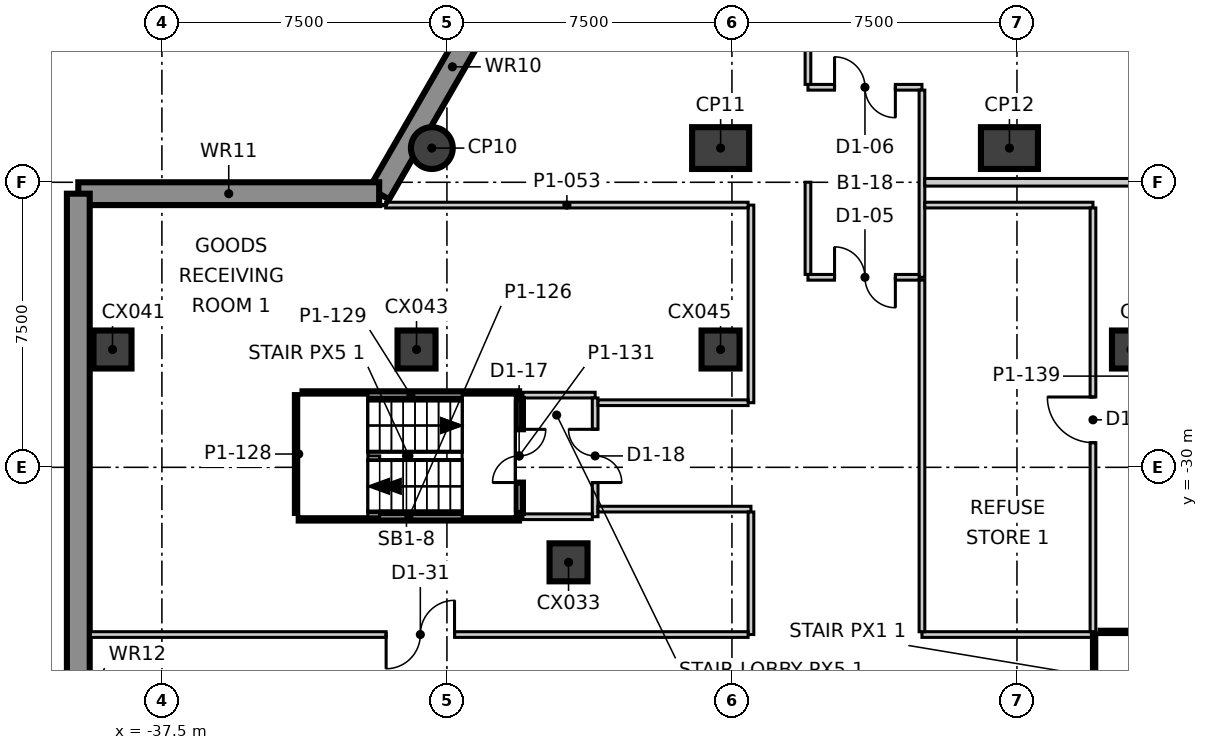
"""IFC4 building model, lengths in metres.
Left out: names, types, materials, properties, quantities, classifications, styles, units other than length and angle.
Written with IfcOpenShell. Run it as: python <this file> out.ifc"""

import sys

from ifc_helpers import new_model, si_unit, direction, frame, frame_2d, origin, origin_2d, place, context, subcontext, project, spatial, rectangle, circle, extrude, element, fill, save


model = new_model("IFC4")
c1 = context("Model", 3, precision=1e-05, world=origin(), true_north=direction((0.0, 1.0)))
c2 = subcontext(c1, "Body", "Model", "MODEL_VIEW")
j1 = project(units=[si_unit("LENGTHUNIT", "METRE"), si_unit("PLANEANGLEUNIT", "RADIAN")], contexts=[c1])
p1 = place(None, origin())
s1 = spatial("IfcSite", under=j1, at=p1, CompositionType="ELEMENT")
p2 = place(p1, origin())
s2 = spatial("IfcBuilding", under=s1, at=p2, CompositionType="ELEMENT")
p3 = place(p2, frame((0.0, 0.0, -5.5)))
s3 = spatial("IfcBuildingStorey", under=s2, at=p3, CompositionType="ELEMENT", Elevation=-5.5)
p4 = place(p3, frame((-27.929, -16.125, -0.4), z_axis=(0.0, 0.0, 1.0), x_axis=(-0.500015828289, -0.866016265125, 0.0)))
e1 = element("IfcWall", 1, at=p4, inside=s3, PredefinedType="SOLIDWALL", context=c2, shape_type="SweptSolid", body=[
    extrude(rectangle(XDim=7.708, YDim=0.6, at=frame_2d((3.854, 0.0))), origin(), (0.0, 0.0, 1.0), 5.5),
])
p5 = place(p3, frame((-31.783, -22.8, -0.4), z_axis=(0.0, 0.0, 1.0), x_axis=(-1.0, 0.0, 0.0)))
e2 = element("IfcWall", 2, at=p5, inside=s3, PredefinedType="SOLIDWALL", context=c2, shape_type="SweptSolid", body=[
    extrude(rectangle(XDim=7.917, YDim=0.6, at=frame_2d((3.958, 0.0))), origin(), (0.0, 0.0, 1.0), 5.5),
])
p6 = place(p3, frame((-39.7, -22.8, -0.4), z_axis=(0.0, 0.0, 1.0), x_axis=(0.0, -1.0, 0.0)))
e3 = element("IfcWall", 3, at=p6, inside=s3, PredefinedType="SOLIDWALL", context=c2, shape_type="SweptSolid", body=[
    extrude(rectangle(XDim=27.4, YDim=0.6, at=frame_2d((13.7, 0.0))), origin(), (0.0, 0.0, 1.0), 5.5),
])
p7 = place(p3, frame((-30.397, -21.6, -0.4), z_axis=(0.0, 0.0, 1.0), x_axis=(1.0, 0.0, 0.0)))
e4 = element("IfcColumn", 4, at=p7, inside=s3, PredefinedType="COLUMN", context=c2, shape_type="SweptSolid", body=[
    extrude(circle(Radius=0.55, at=origin_2d()), origin(), (0.0, 0.0, 1.0), 5.5),
])
for number, where, z_axis, x_axis in (
    (5, (-22.798, -21.6, -0.4), (0.0, 0.0, 1.0), (1.0, 0.0, 0.0)),
    (6, (-15.198, -21.6, -0.4), (0.0, 0.0, 1.0), (1.0, 0.0, 0.0)),
):
    element("IfcColumn", number, at=place(p3, frame(where, z_axis=z_axis, x_axis=x_axis)), inside=s3, PredefinedType="COLUMN", context=c2, shape_type="SweptSolid", body=[
        extrude(rectangle(XDim=1.5, YDim=1.1, at=origin_2d()), origin(), (0.0, 0.0, 1.0), 5.5),
    ])
for number, where, z_axis, x_axis in (
    (7, (-26.8, -32.5, -0.4), (0.0, 0.0, 1.0), (1.0, 0.0, 0.0)),
    (8, (-38.8, -26.9, -0.4), (0.0, 0.0, 1.0), (1.0, 0.0, 0.0)),
    (9, (-30.8, -26.9, -0.4), (0.0, 0.0, 1.0), (1.0, 0.0, 0.0)),
    (10, (-22.8, -26.9, -0.4), (0.0, 0.0, 1.0), (1.0, 0.0, 0.0)),
    (11, (-12.0, -26.9, -0.4), (0.0, 0.0, 1.0), (1.0, 0.0, 0.0)),
):
    element("IfcColumn", number, at=place(p3, frame(where, z_axis=z_axis, x_axis=x_axis)), inside=s3, PredefinedType="COLUMN", context=c2, shape_type="SweptSolid", body=[
        extrude(rectangle(XDim=1.0, YDim=1.0, at=origin_2d()), origin(), (0.0, 0.0, 1.0), 5.5),
    ])
p8 = place(p3, frame((-28.0, -28.1, 0.0), z_axis=(0.0, 0.0, 1.0), x_axis=(1.0, 0.0, 0.0)))
e12 = element("IfcWall", 12, at=p8, inside=s3, PredefinedType="PARTITIONING", context=c2, shape_type="SweptSolid", body=[
    extrude(rectangle(XDim=1.9, YDim=0.15, at=frame_2d((0.95, 0.0))), origin(), (0.0, 0.0, 1.0), 5.1),
])
p9 = place(p3, frame((-26.1, -31.3, 0.0), z_axis=(0.0, 0.0, 1.0), x_axis=(0.0, 1.0, 0.0)))
e13 = element("IfcWall", 13, at=p9, inside=s3, PredefinedType="PARTITIONING", context=c2, shape_type="SweptSolid", body=[
    extrude(rectangle(XDim=3.125, YDim=0.15, at=frame_2d((1.562, 0.0))), origin(), (0.0, 0.0, 1.0), 5.1),
])
p10 = place(p9, frame((0.9, 0.0, 0.0)))
e14 = element("IfcOpeningElement", 14, at=p10, cuts=e13, PredefinedType="OPENING", context=c2, shape_type="SweptSolid", body=[
    extrude(rectangle(XDim=1.4, YDim=2.1, at=frame_2d((0.7, 1.05))), frame((0.0, 0.085, 0.0), z_axis=(0.0, -1.0, 0.0), x_axis=(1.0, 0.0, 0.0)), (0.0, 0.0, 1.0), 0.17),
])
p11 = place(p3, frame((-28.0, -31.3, 0.0), z_axis=(0.0, 0.0, 1.0), x_axis=(1.0, 0.0, 0.0)))
e15 = element("IfcWall", 15, at=p11, inside=s3, PredefinedType="PARTITIONING", context=c2, shape_type="SweptSolid", body=[
    extrude(rectangle(XDim=1.825, YDim=0.15, at=frame_2d((0.913, 0.0))), origin(), (0.0, 0.0, 1.0), 5.1),
])
p12 = place(p3, frame((-20.5, -20.0, 0.0), z_axis=(0.0, 0.0, 1.0), x_axis=(1.0, 0.0, 0.0)))
e16 = element("IfcWall", 16, at=p12, inside=s3, PredefinedType="PARTITIONING", context=c2, shape_type="SweptSolid", body=[
    extrude(rectangle(XDim=3.0, YDim=0.15, at=frame_2d((1.5, 0.0))), origin(), (0.0, 0.0, 1.0), 5.1),
])
p13 = place(p12, frame((0.7, 0.0, 0.0)))
e17 = element("IfcOpeningElement", 17, at=p13, cuts=e16, PredefinedType="OPENING", context=c2, shape_type="SweptSolid", body=[
    extrude(rectangle(XDim=1.6, YDim=2.1, at=frame_2d((0.8, 1.05))), frame((0.0, 0.085, 0.0), z_axis=(0.0, -1.0, 0.0), x_axis=(1.0, 0.0, 0.0)), (0.0, 0.0, 1.0), 0.17),
])
p14 = place(p3, frame((-17.5, -25.0, 0.0), z_axis=(0.0, 0.0, 1.0), x_axis=(0.0, 1.0, 0.0)))
e18 = element("IfcWall", 18, at=p14, inside=s3, PredefinedType="PARTITIONING", context=c2, shape_type="SweptSolid", body=[
    extrude(rectangle(XDim=4.925, YDim=0.15, at=frame_2d((2.462, 0.0))), origin(), (0.0, 0.0, 1.0), 5.1),
])
p15 = place(p3, frame((-20.5, -25.0, 0.0), z_axis=(0.0, 0.0, 1.0), x_axis=(1.0, 0.0, 0.0)))
e19 = element("IfcWall", 19, at=p15, inside=s3, PredefinedType="PARTITIONING", context=c2, shape_type="SweptSolid", body=[
    extrude(rectangle(XDim=2.925, YDim=0.15, at=frame_2d((1.462, 0.0))), origin(), (0.0, 0.0, 1.0), 5.1),
])
p16 = place(p15, frame((0.7, 0.0, 0.0)))
e20 = element("IfcOpeningElement", 20, at=p16, cuts=e19, PredefinedType="OPENING", context=c2, shape_type="SweptSolid", body=[
    extrude(rectangle(XDim=1.6, YDim=2.1, at=frame_2d((0.8, 1.05))), frame((0.0, 0.085, 0.0), z_axis=(0.0, -1.0, 0.0), x_axis=(1.0, 0.0, 0.0)), (0.0, 0.0, 1.0), 0.17),
])
p17 = place(p3, frame((-20.5, -24.925, 0.0), z_axis=(0.0, 0.0, 1.0), x_axis=(0.0, 1.0, 0.0)))
e21 = element("IfcWall", 21, at=p17, inside=s3, PredefinedType="PARTITIONING", context=c2, shape_type="SweptSolid", body=[
    extrude(rectangle(XDim=2.427, YDim=0.15, at=frame_2d((1.213, 0.0))), origin(), (0.0, 0.0, 1.0), 5.1),
])
p18 = place(p3, frame((-26.025, -31.1, 0.0), z_axis=(0.0, 0.0, 1.0), x_axis=(1.0, 0.0, 0.0)))
e22 = element("IfcWall", 22, at=p18, inside=s3, PredefinedType="PARTITIONING", context=c2, shape_type="SweptSolid", body=[
    extrude(rectangle(XDim=4.025, YDim=0.15, at=frame_2d((2.012, 0.0))), origin(), (0.0, 0.0, 1.0), 5.1),
])
p19 = place(p3, frame((-22.0, -34.4, 0.0), z_axis=(0.0, 0.0, 1.0), x_axis=(0.0, 1.0, 0.0)))
e23 = element("IfcWall", 23, at=p19, inside=s3, PredefinedType="PARTITIONING", context=c2, shape_type="SweptSolid", body=[
    extrude(rectangle(XDim=3.225, YDim=0.15, at=frame_2d((1.612, 0.0))), origin(), (0.0, 0.0, 1.0), 5.1),
])
p20 = place(p3, frame((-22.0, -28.3, 0.0), z_axis=(0.0, 0.0, 1.0), x_axis=(0.0, 1.0, 0.0)))
e24 = element("IfcWall", 24, at=p20, inside=s3, PredefinedType="PARTITIONING", context=c2, shape_type="SweptSolid", body=[
    extrude(rectangle(XDim=5.2, YDim=0.15, at=frame_2d((2.6, 0.0))), origin(), (0.0, 0.0, 1.0), 5.1),
])
p21 = place(p3, frame((-39.4, -34.4, 0.0), z_axis=(0.0, 0.0, 1.0), x_axis=(1.0, 0.0, 0.0)))
e25 = element("IfcWall", 25, at=p21, inside=s3, PredefinedType="PARTITIONING", context=c2, shape_type="SweptSolid", body=[
    extrude(rectangle(XDim=17.325, YDim=0.15, at=frame_2d((8.663, 0.0))), origin(), (0.0, 0.0, 1.0), 5.1),
])
p22 = place(p21, frame((7.8, 0.0, 0.0)))
e26 = element("IfcOpeningElement", 26, at=p22, cuts=e25, PredefinedType="OPENING", context=c2, shape_type="SweptSolid", body=[
    extrude(rectangle(XDim=1.8, YDim=2.1, at=frame_2d((0.9, 1.05))), frame((0.0, 0.085, 0.0), z_axis=(0.0, -1.0, 0.0), x_axis=(1.0, 0.0, 0.0)), (0.0, 0.0, 1.0), 0.17),
])
p23 = place(p3, frame((-17.5, -34.4, 0.0), z_axis=(0.0, 0.0, 1.0), x_axis=(1.0, 0.0, 0.0)))
e27 = element("IfcWall", 27, at=p23, inside=s3, PredefinedType="PARTITIONING", context=c2, shape_type="SweptSolid", body=[
    extrude(rectangle(XDim=4.5, YDim=0.15, at=frame_2d((2.25, 0.0))), origin(), (0.0, 0.0, 1.0), 5.1),
])
p24 = place(p3, frame((-31.612, -23.1, 0.0), z_axis=(0.0, 0.0, 1.0), x_axis=(1.0, 0.0, 0.0)))
e28 = element("IfcWall", 28, at=p24, inside=s3, PredefinedType="PARTITIONING", context=c2, shape_type="SweptSolid", body=[
    extrude(rectangle(XDim=9.537, YDim=0.15, at=frame_2d((4.769, 0.0))), origin(), (0.0, 0.0, 1.0), 5.1),
])
p25 = place(p3, frame((-17.425, -23.1, 0.0), z_axis=(0.0, 0.0, 1.0), x_axis=(1.0, 0.0, 0.0)))
e29 = element("IfcWall", 29, at=p25, inside=s3, PredefinedType="PARTITIONING", context=c2, shape_type="SweptSolid", body=[
    extrude(rectangle(XDim=4.425, YDim=0.15, at=frame_2d((2.212, 0.0))), origin(), (0.0, 0.0, 1.0), 5.1),
])
p26 = place(p3, frame((-26.025, -28.3, 0.0), z_axis=(0.0, 0.0, 1.0), x_axis=(1.0, 0.0, 0.0)))
e30 = element("IfcWall", 30, at=p26, inside=s3, PredefinedType="PARTITIONING", context=c2, shape_type="SweptSolid", body=[
    extrude(rectangle(XDim=3.95, YDim=0.15, at=frame_2d((1.975, 0.0))), origin(), (0.0, 0.0, 1.0), 5.1),
])
p27 = place(p3, frame((-13.0, -34.325, 0.0), z_axis=(0.0, 0.0, 1.0), x_axis=(0.0, 1.0, 0.0)))
e31 = element("IfcWall", 31, at=p27, inside=s3, PredefinedType="PARTITIONING", context=c2, shape_type="SweptSolid", body=[
    extrude(rectangle(XDim=11.15, YDim=0.15, at=frame_2d((5.575, 0.0))), origin(), (0.0, 0.0, 1.0), 5.1),
])
p28 = place(p27, frame((4.975, 0.0, 0.0)))
e32 = element("IfcOpeningElement", 32, at=p28, cuts=e31, PredefinedType="OPENING", context=c2, shape_type="SweptSolid", body=[
    extrude(rectangle(XDim=1.2, YDim=2.1, at=frame_2d((0.6, 1.05))), frame((0.0, 0.085, 0.0), z_axis=(0.0, -1.0, 0.0), x_axis=(1.0, 0.0, 0.0)), (0.0, 0.0, 1.0), 0.17),
])
p29 = place(p3, frame((-20.5, -19.925, 0.0), z_axis=(0.0, 0.0, 1.0), x_axis=(0.0, 1.0, 0.0)))
e33 = element("IfcWall", 33, at=p29, inside=s3, PredefinedType="PARTITIONING", context=c2, shape_type="SweptSolid", body=[
    extrude(rectangle(XDim=1.65, YDim=0.15, at=frame_2d((0.825, 0.0))), origin(), (0.0, 0.0, 1.0), 5.1),
])
p30 = place(p3, frame((-17.5, -34.325, 0.0), z_axis=(0.0, 0.0, 1.0), x_axis=(0.0, 1.0, 0.0)))
e34 = element("IfcWall", 34, at=p30, inside=s3, PredefinedType="PARTITIONING", context=c2, shape_type="SweptSolid", body=[
    extrude(rectangle(XDim=9.252, YDim=0.15, at=frame_2d((4.626, 0.0))), origin(), (0.0, 0.0, 1.0), 5.1),
])
p31 = place(p3, frame((-17.425, -22.5, 0.0), z_axis=(0.0, 0.0, 1.0), x_axis=(1.0, 0.0, 0.0)))
e35 = element("IfcWall", 35, at=p31, inside=s3, PredefinedType="SOLIDWALL", context=c2, shape_type="SweptSolid", body=[
    extrude(rectangle(XDim=30.352, YDim=0.2, at=frame_2d((15.176, 0.0))), origin(), (0.0, 0.0, 1.0), 5.1),
])
p32 = place(p3, frame((-33.9, -31.3, 0.0), z_axis=(0.0, 0.0, 1.0), x_axis=(1.0, 0.0, 0.0)))
e36 = element("IfcWall", 36, at=p32, inside=s3, PredefinedType="SOLIDWALL", context=c2, shape_type="SweptSolid", body=[
    extrude(rectangle(XDim=5.798, YDim=0.2, at=frame_2d((2.899, 0.0))), origin(), (0.0, 0.0, 1.0), 5.1),
])
p33 = place(p3, frame((-33.9, -31.2, 0.0), z_axis=(0.0, 0.0, 1.0), x_axis=(0.0, 1.0, 0.0)))
e37 = element("IfcWall", 37, at=p33, inside=s3, PredefinedType="SOLIDWALL", context=c2, shape_type="SweptSolid", body=[
    extrude(rectangle(XDim=3.1, YDim=0.2, at=frame_2d((1.55, 0.0))), origin(), (0.0, 0.0, 1.0), 5.1),
])
p34 = place(p3, frame((-33.8, -28.1, 0.0), z_axis=(0.0, 0.0, 1.0), x_axis=(1.0, 0.0, 0.0)))
e38 = element("IfcWall", 38, at=p34, inside=s3, PredefinedType="SOLIDWALL", context=c2, shape_type="SweptSolid", body=[
    extrude(rectangle(XDim=5.7, YDim=0.2, at=frame_2d((2.85, 0.0))), origin(), (0.0, 0.0, 1.0), 5.1),
])
p35 = place(p3, frame((-28.1, -31.2, 0.0), z_axis=(0.0, 0.0, 1.0), x_axis=(0.0, 1.0, 0.0)))
e39 = element("IfcWall", 39, at=p35, inside=s3, PredefinedType="SOLIDWALL", context=c2, shape_type="SweptSolid", body=[
    extrude(rectangle(XDim=3.0, YDim=0.2, at=frame_2d((1.5, 0.0))), origin(), (0.0, 0.0, 1.0), 5.1),
])
p36 = place(p35, frame((0.8, 0.0, 0.0)))
e40 = element("IfcOpeningElement", 40, at=p36, cuts=e39, PredefinedType="OPENING", context=c2, shape_type="SweptSolid", body=[
    extrude(rectangle(XDim=1.4, YDim=2.1, at=frame_2d((0.7, 1.05))), frame((0.0, 0.11, 0.0), z_axis=(0.0, -1.0, 0.0), x_axis=(1.0, 0.0, 0.0)), (0.0, 0.0, 1.0), 0.22),
])
p37 = place(p3, frame((-12.9, -37.5, 0.0), z_axis=(0.0, 0.0, 1.0), x_axis=(0.0, 1.0, 0.0)))
e41 = element("IfcWall", 41, at=p37, inside=s3, PredefinedType="SOLIDWALL", context=c2, shape_type="SweptSolid", body=[
    extrude(rectangle(XDim=3.1, YDim=0.2, at=frame_2d((1.55, 0.0))), origin(), (0.0, 0.0, 1.0), 5.1),
])
p38 = place(p3, frame((-12.8, -34.4, 0.0), z_axis=(0.0, 0.0, 1.0), x_axis=(1.0, 0.0, 0.0)))
e42 = element("IfcWall", 42, at=p38, inside=s3, PredefinedType="SOLIDWALL", context=c2, shape_type="SweptSolid", body=[
    extrude(rectangle(XDim=5.7, YDim=0.2, at=frame_2d((2.85, 0.0))), origin(), (0.0, 0.0, 1.0), 5.1),
])
p39 = place(p16, origin())
e43 = element("IfcDoor", 43, at=p39, inside=s3, OperationType="DOUBLE_DOOR_SINGLE_SWING", PredefinedType="DOOR", context=c2, shape_type="SweptSolid", body=[
    extrude(rectangle(XDim=1.6, YDim=2.1, at=frame_2d((0.8, 1.05))), frame((0.0, 0.025, 0.0), z_axis=(0.0, -1.0, 0.0), x_axis=(1.0, 0.0, 0.0)), (0.0, 0.0, 1.0), 0.05),
])
fill(e20, e43)
p40 = place(p13, origin())
e44 = element("IfcDoor", 44, at=p40, inside=s3, OperationType="DOUBLE_DOOR_SINGLE_SWING", PredefinedType="DOOR", context=c2, shape_type="SweptSolid", body=[
    extrude(rectangle(XDim=1.6, YDim=2.1, at=frame_2d((0.8, 1.05))), frame((0.0, 0.025, 0.0), z_axis=(0.0, -1.0, 0.0), x_axis=(1.0, 0.0, 0.0)), (0.0, 0.0, 1.0), 0.05),
])
fill(e17, e44)
p41 = place(p36, origin())
e45 = element("IfcDoor", 45, at=p41, inside=s3, OperationType="DOUBLE_DOOR_SINGLE_SWING", PredefinedType="DOOR", context=c2, shape_type="SweptSolid", body=[
    extrude(rectangle(XDim=1.4, YDim=2.1, at=frame_2d((0.7, 1.05))), frame((0.0, 0.025, 0.0), z_axis=(0.0, -1.0, 0.0), x_axis=(1.0, 0.0, 0.0)), (0.0, 0.0, 1.0), 0.05),
])
fill(e40, e45)
p42 = place(p10, origin())
e46 = element("IfcDoor", 46, at=p42, inside=s3, OperationType="DOUBLE_DOOR_SINGLE_SWING", PredefinedType="DOOR", context=c2, shape_type="SweptSolid", body=[
    extrude(rectangle(XDim=1.4, YDim=2.1, at=frame_2d((0.7, 1.05))), frame((0.0, 0.025, 0.0), z_axis=(0.0, -1.0, 0.0), x_axis=(1.0, 0.0, 0.0)), (0.0, 0.0, 1.0), 0.05),
])
fill(e14, e46)
p43 = place(p22, origin())
e47 = element("IfcDoor", 47, at=p43, inside=s3, OperationType="DOUBLE_DOOR_SINGLE_SWING", PredefinedType="DOOR", context=c2, shape_type="SweptSolid", body=[
    extrude(rectangle(XDim=1.8, YDim=2.1, at=frame_2d((0.9, 1.05))), frame((0.0, 0.025, 0.0), z_axis=(0.0, -1.0, 0.0), x_axis=(1.0, 0.0, 0.0)), (0.0, 0.0, 1.0), 0.05),
])
fill(e26, e47)
p44 = place(p28, origin())
e48 = element("IfcDoor", 48, at=p44, inside=s3, OperationType="SINGLE_SWING_LEFT", PredefinedType="DOOR", context=c2, shape_type="SweptSolid", body=[
    extrude(rectangle(XDim=1.2, YDim=2.1, at=frame_2d((0.6, 1.05))), frame((0.0, 0.025, 0.0), z_axis=(0.0, -1.0, 0.0), x_axis=(1.0, 0.0, 0.0)), (0.0, 0.0, 1.0), 0.05),
])
fill(e32, e48)
save(model, sys.argv[1])
